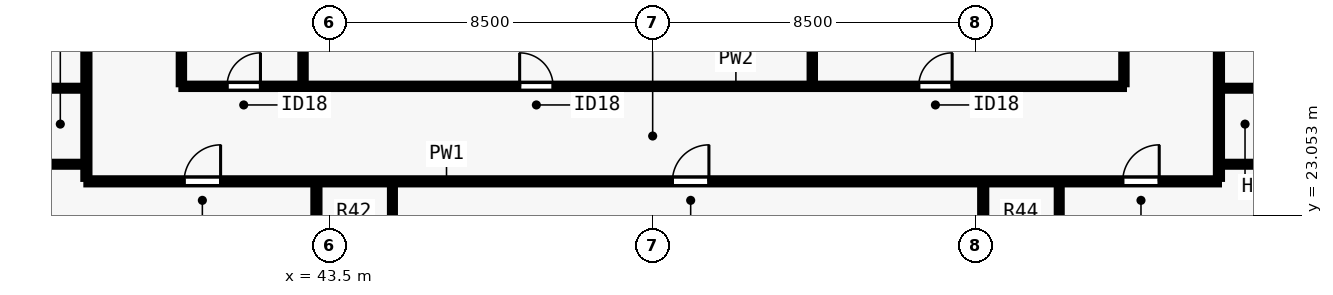
"""IFC4 building model, lengths in metres.
Left out: names, types, materials, properties, quantities, classifications, styles, units other than length and angle.
Written with IfcOpenShell. Run it as: python <this file> out.ifc"""

import sys

from ifc_helpers import new_model, si_unit, direction, frame, frame_2d, origin, place, context, subcontext, project, spatial, rectangle, extrude, element, fill, save


model = new_model("IFC4")
c1 = context("Model", 3, precision=1e-05, world=origin(), true_north=direction((0.0, 1.0)))
c2 = subcontext(c1, "Body", "Model", "MODEL_VIEW")
j1 = project(units=[si_unit("LENGTHUNIT", "METRE"), si_unit("PLANEANGLEUNIT", "RADIAN")], contexts=[c1])
p1 = place(None, origin())
s1 = spatial("IfcSite", under=j1, at=p1, CompositionType="ELEMENT")
p2 = place(p1, origin())
s2 = spatial("IfcBuilding", under=s1, at=p2, CompositionType="ELEMENT")
p3 = place(p2, frame((0.0, 0.0, 90.0)))
s3 = spatial("IfcBuildingStorey", under=s2, at=p3, CompositionType="ELEMENT", Elevation=90.0)
p4 = place(p3, frame((37.1, 23.95, 0.0), z_axis=(0.0, 0.0, 1.0), x_axis=(1.0, 0.0, 0.0)))
e1 = element("IfcWall", 1, at=p4, inside=s3, PredefinedType="PARTITIONING", context=c2, shape_type="SweptSolid", body=[
    extrude(rectangle(XDim=29.8, YDim=0.16, at=frame_2d((14.9, 0.0))), origin(), (0.0, 0.0, 1.0), 3.28),
])
p5 = place(p4, frame((2.571, 0.0, 0.0)))
e2 = element("IfcOpeningElement", 2, at=p5, cuts=e1, PredefinedType="OPENING", context=c2, shape_type="SweptSolid", body=[
    extrude(rectangle(XDim=0.96, YDim=2.15, at=frame_2d((0.48, 1.075))), frame((0.0, 0.09, 0.0), z_axis=(0.0, -1.0, 0.0), x_axis=(1.0, 0.0, 0.0)), (0.0, 0.0, 1.0), 0.18),
])
p6 = place(p4, frame((15.42, 0.0, 0.0)))
e3 = element("IfcOpeningElement", 3, at=p6, cuts=e1, PredefinedType="OPENING", context=c2, shape_type="SweptSolid", body=[
    extrude(rectangle(XDim=0.96, YDim=2.15, at=frame_2d((0.48, 1.075))), frame((0.0, 0.09, 0.0), z_axis=(0.0, -1.0, 0.0), x_axis=(1.0, 0.0, 0.0)), (0.0, 0.0, 1.0), 0.18),
])
p7 = place(p4, frame((27.269, 0.0, 0.0)))
e4 = element("IfcOpeningElement", 4, at=p7, cuts=e1, PredefinedType="OPENING", context=c2, shape_type="SweptSolid", body=[
    extrude(rectangle(XDim=0.96, YDim=2.15, at=frame_2d((0.48, 1.075))), frame((0.0, 0.09, 0.0), z_axis=(0.0, -1.0, 0.0), x_axis=(1.0, 0.0, 0.0)), (0.0, 0.0, 1.0), 0.18),
])
p8 = place(p3, frame((37.1, 24.015, 0.0), z_axis=(0.0, 0.0, 1.0), x_axis=(0.0, 1.0, 0.0)))
e5 = element("IfcWall", 5, at=p8, inside=s3, PredefinedType="PARTITIONING", context=c2, shape_type="SweptSolid", body=[
    extrude(rectangle(XDim=29.97, YDim=0.16, at=frame_2d((14.985, 0.0))), origin(), (0.0, 0.0, 1.0), 3.28),
])
p9 = place(p8, frame((8.134, 0.0, 0.0)))
e6 = element("IfcOpeningElement", 6, at=p9, cuts=e5, PredefinedType="OPENING", context=c2, shape_type="SweptSolid", body=[
    extrude(rectangle(XDim=0.96, YDim=2.15, at=frame_2d((0.48, 1.075))), frame((0.0, 0.09, 0.0), z_axis=(0.0, -1.0, 0.0), x_axis=(1.0, 0.0, 0.0)), (0.0, 0.0, 1.0), 0.18),
])
p10 = place(p8, frame((22.934, 0.0, 0.0)))
e7 = element("IfcOpeningElement", 7, at=p10, cuts=e5, PredefinedType="OPENING", context=c2, shape_type="SweptSolid", body=[
    extrude(rectangle(XDim=0.96, YDim=2.15, at=frame_2d((0.48, 1.075))), frame((0.0, 0.09, 0.0), z_axis=(0.0, -1.0, 0.0), x_axis=(1.0, 0.0, 0.0)), (0.0, 0.0, 1.0), 0.18),
])
p11 = place(p3, frame((66.9, 24.015, 0.0), z_axis=(0.0, 0.0, 1.0), x_axis=(0.0, 1.0, 0.0)))
e8 = element("IfcWall", 8, at=p11, inside=s3, PredefinedType="PARTITIONING", context=c2, shape_type="SweptSolid", body=[
    extrude(rectangle(XDim=29.97, YDim=0.16, at=frame_2d((14.985, 0.0))), origin(), (0.0, 0.0, 1.0), 3.28),
])
p12 = place(p11, frame((3.911, 0.0, 0.0)))
e9 = element("IfcOpeningElement", 9, at=p12, cuts=e8, PredefinedType="OPENING", context=c2, shape_type="SweptSolid", body=[
    extrude(rectangle(XDim=0.96, YDim=2.15, at=frame_2d((0.48, 1.075))), frame((0.0, 0.09, 0.0), z_axis=(0.0, -1.0, 0.0), x_axis=(1.0, 0.0, 0.0)), (0.0, 0.0, 1.0), 0.18),
])
p13 = place(p11, frame((9.544, 0.0, 0.0)))
e10 = element("IfcOpeningElement", 10, at=p13, cuts=e8, PredefinedType="OPENING", context=c2, shape_type="SweptSolid", body=[
    extrude(rectangle(XDim=0.96, YDim=2.15, at=frame_2d((0.48, 1.075))), frame((0.0, 0.09, 0.0), z_axis=(0.0, -1.0, 0.0), x_axis=(1.0, 0.0, 0.0)), (0.0, 0.0, 1.0), 0.18),
])
p14 = place(p11, frame((15.625, 0.0, 0.0)))
e11 = element("IfcOpeningElement", 11, at=p14, cuts=e8, PredefinedType="OPENING", context=c2, shape_type="SweptSolid", body=[
    extrude(rectangle(XDim=0.96, YDim=2.15, at=frame_2d((0.48, 1.075))), frame((0.0, 0.09, 0.0), z_axis=(0.0, -1.0, 0.0), x_axis=(1.0, 0.0, 0.0)), (0.0, 0.0, 1.0), 0.18),
])
p15 = place(p11, frame((21.584, 0.0, 0.0)))
e12 = element("IfcOpeningElement", 12, at=p15, cuts=e8, PredefinedType="OPENING", context=c2, shape_type="SweptSolid", body=[
    extrude(rectangle(XDim=0.96, YDim=2.15, at=frame_2d((0.48, 1.075))), frame((0.0, 0.09, 0.0), z_axis=(0.0, -1.0, 0.0), x_axis=(1.0, 0.0, 0.0)), (0.0, 0.0, 1.0), 0.18),
])
p16 = place(p11, frame((27.494, 0.0, 0.0)))
e13 = element("IfcOpeningElement", 13, at=p16, cuts=e8, PredefinedType="OPENING", context=c2, shape_type="SweptSolid", body=[
    extrude(rectangle(XDim=0.96, YDim=2.15, at=frame_2d((0.48, 1.075))), frame((0.0, 0.09, 0.0), z_axis=(0.0, -1.0, 0.0), x_axis=(1.0, 0.0, 0.0)), (0.0, 0.0, 1.0), 0.18),
])
p17 = place(p3, frame((39.6, 26.45, 0.0), z_axis=(0.0, 0.0, 1.0), x_axis=(1.0, 0.0, 0.0)))
e14 = element("IfcWall", 14, at=p17, inside=s3, PredefinedType="PARTITIONING", context=c2, shape_type="SweptSolid", body=[
    extrude(rectangle(XDim=24.8, YDim=0.14, at=frame_2d((12.4, 0.0))), origin(), (0.0, 0.0, 1.0), 3.28),
])
p18 = place(p17, frame((1.2, 0.0, 0.0)))
e15 = element("IfcOpeningElement", 15, at=p18, cuts=e14, PredefinedType="OPENING", context=c2, shape_type="SweptSolid", body=[
    extrude(rectangle(XDim=0.88, YDim=2.1, at=frame_2d((0.44, 1.05))), frame((0.0, 0.08, 0.0), z_axis=(0.0, -1.0, 0.0), x_axis=(1.0, 0.0, 0.0)), (0.0, 0.0, 1.0), 0.16),
])
p19 = place(p17, frame((8.9, 0.0, 0.0)))
e16 = element("IfcOpeningElement", 16, at=p19, cuts=e14, PredefinedType="OPENING", context=c2, shape_type="SweptSolid", body=[
    extrude(rectangle(XDim=0.88, YDim=2.1, at=frame_2d((0.44, 1.05))), frame((0.0, 0.08, 0.0), z_axis=(0.0, -1.0, 0.0), x_axis=(1.0, 0.0, 0.0)), (0.0, 0.0, 1.0), 0.16),
])
p20 = place(p17, frame((19.4, 0.0, 0.0)))
e17 = element("IfcOpeningElement", 17, at=p20, cuts=e14, PredefinedType="OPENING", context=c2, shape_type="SweptSolid", body=[
    extrude(rectangle(XDim=0.88, YDim=2.1, at=frame_2d((0.44, 1.05))), frame((0.0, 0.08, 0.0), z_axis=(0.0, -1.0, 0.0), x_axis=(1.0, 0.0, 0.0)), (0.0, 0.0, 1.0), 0.16),
])
p21 = place(p3, frame((39.6, 26.505, 0.0), z_axis=(0.0, 0.0, 1.0), x_axis=(0.0, 1.0, 0.0)))
e18 = element("IfcWall", 18, at=p21, inside=s3, PredefinedType="PARTITIONING", context=c2, shape_type="SweptSolid", body=[
    extrude(rectangle(XDim=12.245, YDim=0.14, at=frame_2d((6.123, 0.0))), origin(), (0.0, 0.0, 1.0), 3.28),
])
p22 = place(p21, frame((1.045, 0.0, 0.0)))
e19 = element("IfcOpeningElement", 19, at=p22, cuts=e18, PredefinedType="OPENING", context=c2, shape_type="SweptSolid", body=[
    extrude(rectangle(XDim=0.88, YDim=2.1, at=frame_2d((0.44, 1.05))), frame((0.0, 0.08, 0.0), z_axis=(0.0, -1.0, 0.0), x_axis=(1.0, 0.0, 0.0)), (0.0, 0.0, 1.0), 0.16),
])
p23 = place(p21, frame((9.295, 0.0, 0.0)))
e20 = element("IfcOpeningElement", 20, at=p23, cuts=e18, PredefinedType="OPENING", context=c2, shape_type="SweptSolid", body=[
    extrude(rectangle(XDim=0.88, YDim=2.1, at=frame_2d((0.44, 1.05))), frame((0.0, 0.08, 0.0), z_axis=(0.0, -1.0, 0.0), x_axis=(1.0, 0.0, 0.0)), (0.0, 0.0, 1.0), 0.16),
])
p24 = place(p3, frame((64.4, 26.505, 0.0), z_axis=(0.0, 0.0, 1.0), x_axis=(0.0, 1.0, 0.0)))
e21 = element("IfcWall", 21, at=p24, inside=s3, PredefinedType="PARTITIONING", context=c2, shape_type="SweptSolid", body=[
    extrude(rectangle(XDim=12.245, YDim=0.14, at=frame_2d((6.123, 0.0))), origin(), (0.0, 0.0, 1.0), 3.28),
])
p25 = place(p24, frame((2.445, 0.0, 0.0)))
e22 = element("IfcOpeningElement", 22, at=p25, cuts=e21, PredefinedType="OPENING", context=c2, shape_type="SweptSolid", body=[
    extrude(rectangle(XDim=0.88, YDim=2.1, at=frame_2d((0.44, 1.05))), frame((0.0, 0.08, 0.0), z_axis=(0.0, -1.0, 0.0), x_axis=(1.0, 0.0, 0.0)), (0.0, 0.0, 1.0), 0.16),
])
p26 = place(p3, frame((42.8, 26.505, 0.0), z_axis=(0.0, 0.0, 1.0), x_axis=(0.0, 1.0, 0.0)))
e23 = element("IfcWall", 23, at=p26, inside=s3, PredefinedType="PARTITIONING", context=c2, shape_type="SweptSolid", body=[
    extrude(rectangle(XDim=3.995, YDim=0.14, at=frame_2d((1.998, 0.0))), origin(), (0.0, 0.0, 1.0), 2.439),
])
p27 = place(p3, frame((56.2, 26.505, 0.0), z_axis=(0.0, 0.0, 1.0), x_axis=(0.0, 1.0, 0.0)))
e24 = element("IfcWall", 24, at=p27, inside=s3, PredefinedType="PARTITIONING", context=c2, shape_type="SweptSolid", body=[
    extrude(rectangle(XDim=3.735, YDim=0.14, at=frame_2d((1.868, 0.0))), origin(), (0.0, 0.0, 1.0), 2.849),
])
p28 = place(p3, frame((43.153, 13.845, 0.0), z_axis=(0.0, 0.0, 1.0), x_axis=(0.0, 1.0, 0.0)))
e25 = element("IfcWall", 25, at=p28, inside=s3, PredefinedType="PARTITIONING", context=c2, shape_type="SweptSolid", body=[
    extrude(rectangle(XDim=10.04, YDim=0.16, at=frame_2d((5.02, 0.0))), origin(), (0.0, 0.0, 1.0), 3.28),
])
p29 = place(p3, frame((45.153, 21.65, 0.0), z_axis=(0.0, 0.0, 1.0), x_axis=(0.0, 1.0, 0.0)))
e26 = element("IfcWall", 26, at=p29, inside=s3, PredefinedType="PLUMBINGWALL", context=c2, shape_type="SweptSolid", body=[
    extrude(rectangle(XDim=2.235, YDim=0.13, at=frame_2d((1.118, 0.0))), origin(), (0.0, 0.0, 1.0), 3.28),
])
p30 = place(p3, frame((60.698, 13.845, 0.0), z_axis=(0.0, 0.0, 1.0), x_axis=(0.0, 1.0, 0.0)))
e27 = element("IfcWall", 27, at=p30, inside=s3, PredefinedType="PARTITIONING", context=c2, shape_type="SweptSolid", body=[
    extrude(rectangle(XDim=10.04, YDim=0.16, at=frame_2d((5.02, 0.0))), origin(), (0.0, 0.0, 1.0), 3.28),
])
p31 = place(p3, frame((62.698, 21.65, 0.0), z_axis=(0.0, 0.0, 1.0), x_axis=(0.0, 1.0, 0.0)))
e28 = element("IfcWall", 28, at=p31, inside=s3, PredefinedType="PLUMBINGWALL", context=c2, shape_type="SweptSolid", body=[
    extrude(rectangle(XDim=2.235, YDim=0.13, at=frame_2d((1.118, 0.0))), origin(), (0.0, 0.0, 1.0), 3.28),
])
p32 = place(p3, frame((34.8, 24.4, 0.0), z_axis=(0.0, 0.0, 1.0), x_axis=(1.0, 0.0, 0.0)))
e29 = element("IfcWall", 29, at=p32, inside=s3, PredefinedType="PLUMBINGWALL", context=c2, shape_type="SweptSolid", body=[
    extrude(rectangle(XDim=2.235, YDim=0.13, at=frame_2d((1.117, 0.0))), origin(), (0.0, 0.0, 1.0), 2.849),
])
p33 = place(p3, frame((34.8, 26.4, 0.0), z_axis=(0.0, 0.0, 1.0), x_axis=(1.0, 0.0, 0.0)))
e30 = element("IfcWall", 30, at=p33, inside=s3, PredefinedType="PLUMBINGWALL", context=c2, shape_type="SweptSolid", body=[
    extrude(rectangle(XDim=2.235, YDim=0.13, at=frame_2d((1.117, 0.0))), origin(), (0.0, 0.0, 1.0), 3.28),
])
p34 = place(p3, frame((66.965, 24.4, 0.0), z_axis=(0.0, 0.0, 1.0), x_axis=(1.0, 0.0, 0.0)))
e31 = element("IfcWall", 31, at=p34, inside=s3, PredefinedType="PLUMBINGWALL", context=c2, shape_type="SweptSolid", body=[
    extrude(rectangle(XDim=2.235, YDim=0.13, at=frame_2d((1.117, 0.0))), origin(), (0.0, 0.0, 1.0), 2.849),
])
p35 = place(p3, frame((66.965, 26.4, 0.0), z_axis=(0.0, 0.0, 1.0), x_axis=(1.0, 0.0, 0.0)))
e32 = element("IfcWall", 32, at=p35, inside=s3, PredefinedType="PLUMBINGWALL", context=c2, shape_type="SweptSolid", body=[
    extrude(rectangle(XDim=2.235, YDim=0.13, at=frame_2d((1.117, 0.0))), origin(), (0.0, 0.0, 1.0), 3.28),
])
p36 = place(p18, origin())
e33 = element("IfcDoor", 33, at=p36, inside=s3, OperationType="SINGLE_SWING_RIGHT", PredefinedType="DOOR", context=c2, shape_type="SweptSolid", body=[
    extrude(rectangle(XDim=0.88, YDim=2.1, at=frame_2d((0.44, 1.05))), frame((0.0, 0.025, 0.0), z_axis=(0.0, -1.0, 0.0), x_axis=(1.0, 0.0, 0.0)), (0.0, 0.0, 1.0), 0.05),
])
fill(e15, e33)
p37 = place(p19, origin())
e34 = element("IfcDoor", 34, at=p37, inside=s3, OperationType="SINGLE_SWING_LEFT", PredefinedType="DOOR", context=c2, shape_type="SweptSolid", body=[
    extrude(rectangle(XDim=0.88, YDim=2.1, at=frame_2d((0.44, 1.05))), frame((0.0, 0.025, 0.0), z_axis=(0.0, -1.0, 0.0), x_axis=(1.0, 0.0, 0.0)), (0.0, 0.0, 1.0), 0.05),
])
fill(e16, e34)
p38 = place(p20, origin())
e35 = element("IfcDoor", 35, at=p38, inside=s3, OperationType="SINGLE_SWING_RIGHT", PredefinedType="DOOR", context=c2, shape_type="SweptSolid", body=[
    extrude(rectangle(XDim=0.88, YDim=2.1, at=frame_2d((0.44, 1.05))), frame((0.0, 0.025, 0.0), z_axis=(0.0, -1.0, 0.0), x_axis=(1.0, 0.0, 0.0)), (0.0, 0.0, 1.0), 0.05),
])
fill(e17, e35)
p39 = place(p5, origin())
e36 = element("IfcDoor", 36, at=p39, inside=s3, OperationType="SINGLE_SWING_RIGHT", PredefinedType="DOOR", context=c2, shape_type="SweptSolid", body=[
    extrude(rectangle(XDim=0.96, YDim=2.15, at=frame_2d((0.48, 1.075))), frame((0.0, 0.025, 0.0), z_axis=(0.0, -1.0, 0.0), x_axis=(1.0, 0.0, 0.0)), (0.0, 0.0, 1.0), 0.05),
])
fill(e2, e36)
p40 = place(p6, origin())
e37 = element("IfcDoor", 37, at=p40, inside=s3, OperationType="SINGLE_SWING_RIGHT", PredefinedType="DOOR", context=c2, shape_type="SweptSolid", body=[
    extrude(rectangle(XDim=0.96, YDim=2.15, at=frame_2d((0.48, 1.075))), frame((0.0, 0.025, 0.0), z_axis=(0.0, -1.0, 0.0), x_axis=(1.0, 0.0, 0.0)), (0.0, 0.0, 1.0), 0.05),
])
fill(e3, e37)
p41 = place(p7, origin())
e38 = element("IfcDoor", 38, at=p41, inside=s3, OperationType="SINGLE_SWING_RIGHT", PredefinedType="DOOR", context=c2, shape_type="SweptSolid", body=[
    extrude(rectangle(XDim=0.96, YDim=2.15, at=frame_2d((0.48, 1.075))), frame((0.0, 0.025, 0.0), z_axis=(0.0, -1.0, 0.0), x_axis=(1.0, 0.0, 0.0)), (0.0, 0.0, 1.0), 0.05),
])
fill(e4, e38)
save(model, sys.argv[1])
